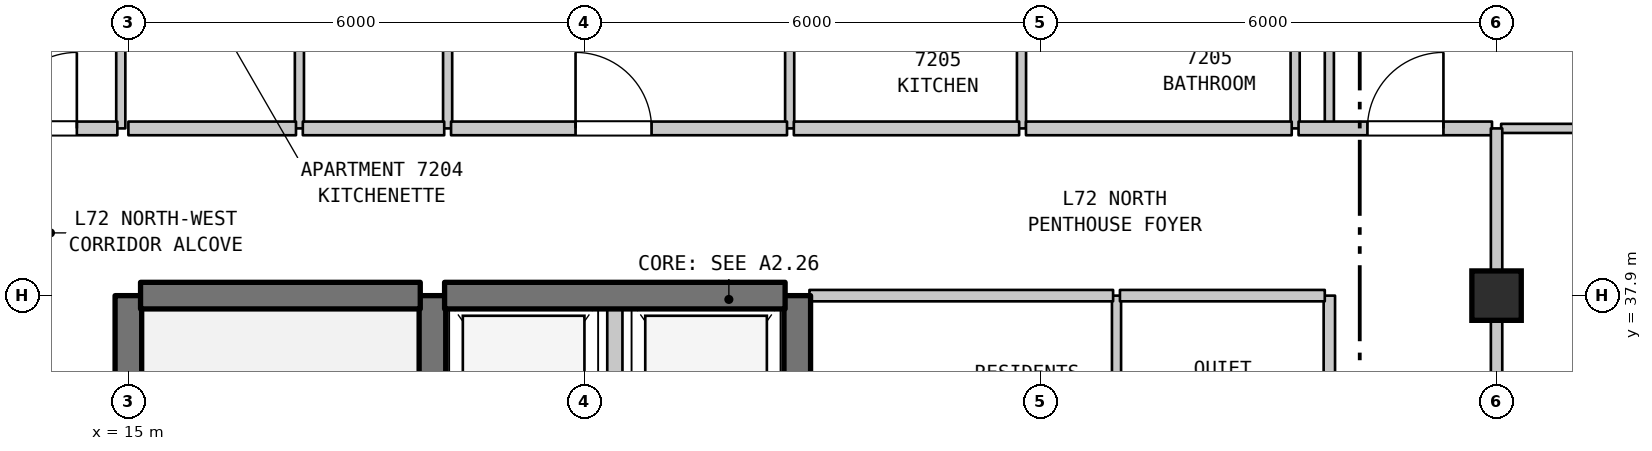
"""IFC4 building model, lengths in metres.
Left out: names, types, materials, properties, quantities, classifications, styles, units other than length and angle.
Written with IfcOpenShell. Run it as: python <this file> out.ifc"""

import sys

from ifc_helpers import new_model, si_unit, direction, frame, frame_2d, origin, origin_2d, place, context, subcontext, project, spatial, rectangle, extrude, element, fill, save


model = new_model("IFC4")
c1 = context("Model", 3, precision=1e-05, world=origin(), true_north=direction((0.0, 1.0)))
c2 = subcontext(c1, "Body", "Model", "MODEL_VIEW")
j1 = project(units=[si_unit("LENGTHUNIT", "METRE"), si_unit("PLANEANGLEUNIT", "RADIAN")], contexts=[c1])
p1 = place(None, origin())
s1 = spatial("IfcSite", under=j1, at=p1, CompositionType="ELEMENT")
p2 = place(p1, origin())
s2 = spatial("IfcBuilding", under=s1, at=p2, CompositionType="ELEMENT")
p3 = place(p2, frame((0.0, 0.0, 288.0)))
s3 = spatial("IfcBuildingStorey", under=s2, at=p3, CompositionType="ELEMENT", Elevation=288.0)
p4 = place(p3, frame((33.0, 37.9, 0.0), z_axis=(0.0, 0.0, 1.0), x_axis=(1.0, 0.0, 0.0)))
e1 = element("IfcColumn", 1, at=p4, inside=s3, PredefinedType="COLUMN", context=c2, shape_type="SweptSolid", body=[
    extrude(rectangle(XDim=0.65, YDim=0.65, at=origin_2d()), origin(), (0.0, 0.0, 1.0), 3.7),
])
p5 = place(p3, frame((14.9, 40.1, 0.0), z_axis=(0.0, 0.0, 1.0), x_axis=(0.0, 1.0, 0.0)))
e2 = element("IfcWall", 2, at=p5, inside=s3, PredefinedType="PARTITIONING", context=c2, shape_type="SweptSolid", body=[
    extrude(rectangle(XDim=3.2, YDim=0.12, at=frame_2d((1.6, 0.0))), origin(), (0.0, 0.0, 1.0), 3.39),
])
p6 = place(p5, frame((1.15, 0.0, 0.0)))
e3 = element("IfcOpeningElement", 3, at=p6, cuts=e2, PredefinedType="OPENING", context=c2, shape_type="SweptSolid", body=[
    extrude(rectangle(XDim=0.9, YDim=2.15, at=frame_2d((0.45, 1.075))), frame((0.0, 0.07, 0.0), z_axis=(0.0, -1.0, 0.0), x_axis=(1.0, 0.0, 0.0)), (0.0, 0.0, 1.0), 0.14),
])
p7 = place(p3, frame((15.0, 31.1, 0.0), z_axis=(0.0, 0.0, 1.0), x_axis=(0.0, 1.0, 0.0)))
e4 = element("IfcWall", 4, at=p7, inside=s3, PredefinedType="SHEAR", context=c2, shape_type="SweptSolid", body=[
    extrude(rectangle(XDim=6.8, YDim=0.35, at=frame_2d((3.4, 0.0))), origin(), (0.0, 0.0, 1.0), 3.39),
])
p8 = place(p3, frame((17.25, 40.1, 0.0), z_axis=(0.0, 0.0, 1.0), x_axis=(0.0, 1.0, 0.0)))
e5 = element("IfcWall", 5, at=p8, inside=s3, PredefinedType="PARTITIONING", context=c2, shape_type="SweptSolid", body=[
    extrude(rectangle(XDim=3.2, YDim=0.12, at=frame_2d((1.6, 0.0))), origin(), (0.0, 0.0, 1.0), 3.39),
])
p9 = place(p3, frame((19.0, 35.0, 0.0), z_axis=(0.0, 0.0, 1.0), x_axis=(0.0, 1.0, 0.0)))
e6 = element("IfcWall", 6, at=p9, inside=s3, PredefinedType="SHEAR", context=c2, shape_type="SweptSolid", body=[
    extrude(rectangle(XDim=2.9, YDim=0.35, at=frame_2d((1.45, 0.0))), origin(), (0.0, 0.0, 1.0), 3.39),
])
p10 = place(p3, frame((19.2, 40.1, 0.0), z_axis=(0.0, 0.0, 1.0), x_axis=(0.0, 1.0, 0.0)))
e7 = element("IfcWall", 7, at=p10, inside=s3, PredefinedType="PARTITIONING", context=c2, shape_type="SweptSolid", body=[
    extrude(rectangle(XDim=13.79, YDim=0.12, at=frame_2d((6.895, 0.0))), origin(), (0.0, 0.0, 1.0), 3.39),
])
p11 = place(p3, frame((21.4, 35.0, 0.0), z_axis=(0.0, 0.0, 1.0), x_axis=(0.0, 1.0, 0.0)))
e8 = element("IfcWall", 8, at=p11, inside=s3, PredefinedType="STANDARD", context=c2, shape_type="SweptSolid", body=[
    extrude(rectangle(XDim=2.9, YDim=0.2, at=frame_2d((1.45, 0.0))), origin(), (0.0, 0.0, 1.0), 3.39),
])
p12 = place(p3, frame((23.7, 40.1, 0.0), z_axis=(0.0, 0.0, 1.0), x_axis=(0.0, 1.0, 0.0)))
e9 = element("IfcWall", 9, at=p12, inside=s3, PredefinedType="PARTITIONING", context=c2, shape_type="SweptSolid", body=[
    extrude(rectangle(XDim=2.3, YDim=0.12, at=frame_2d((1.15, 0.0))), origin(), (0.0, 0.0, 1.0), 3.39),
])
p13 = place(p3, frame((23.8, 35.0, 0.0), z_axis=(0.0, 0.0, 1.0), x_axis=(0.0, 1.0, 0.0)))
e10 = element("IfcWall", 10, at=p13, inside=s3, PredefinedType="SHEAR", context=c2, shape_type="SweptSolid", body=[
    extrude(rectangle(XDim=2.9, YDim=0.35, at=frame_2d((1.45, 0.0))), origin(), (0.0, 0.0, 1.0), 3.39),
])
p14 = place(p3, frame((26.75, 40.1, 0.0), z_axis=(0.0, 0.0, 1.0), x_axis=(0.0, 1.0, 0.0)))
e11 = element("IfcWall", 11, at=p14, inside=s3, PredefinedType="PARTITIONING", context=c2, shape_type="SweptSolid", body=[
    extrude(rectangle(XDim=2.3, YDim=0.12, at=frame_2d((1.15, 0.0))), origin(), (0.0, 0.0, 1.0), 3.39),
])
p15 = place(p3, frame((28.0, 35.0, 0.0), z_axis=(0.0, 0.0, 1.0), x_axis=(0.0, 1.0, 0.0)))
e12 = element("IfcWall", 12, at=p15, inside=s3, PredefinedType="PARTITIONING", context=c2, shape_type="SweptSolid", body=[
    extrude(rectangle(XDim=2.9, YDim=0.12, at=frame_2d((1.45, 0.0))), origin(), (0.0, 0.0, 1.0), 3.39),
])
p16 = place(p3, frame((30.35, 40.1, 0.0), z_axis=(0.0, 0.0, 1.0), x_axis=(0.0, 1.0, 0.0)))
e13 = element("IfcWall", 13, at=p16, inside=s3, PredefinedType="PARTITIONING", context=c2, shape_type="SweptSolid", body=[
    extrude(rectangle(XDim=2.3, YDim=0.12, at=frame_2d((1.15, 0.0))), origin(), (0.0, 0.0, 1.0), 3.39),
])
p17 = place(p3, frame((30.8, 35.0, 0.0), z_axis=(0.0, 0.0, 1.0), x_axis=(0.0, 1.0, 0.0)))
e14 = element("IfcWall", 14, at=p17, inside=s3, PredefinedType="STANDARD", context=c2, shape_type="SweptSolid", body=[
    extrude(rectangle(XDim=2.9, YDim=0.15, at=frame_2d((1.45, 0.0))), origin(), (0.0, 0.0, 1.0), 3.39),
])
p18 = place(p3, frame((30.8, 40.1, 0.0), z_axis=(0.0, 0.0, 1.0), x_axis=(0.0, 1.0, 0.0)))
e15 = element("IfcWall", 15, at=p18, inside=s3, PredefinedType="PARTITIONING", context=c2, shape_type="SweptSolid", body=[
    extrude(rectangle(XDim=13.79, YDim=0.12, at=frame_2d((6.895, 0.0))), origin(), (0.0, 0.0, 1.0), 3.39),
])
p19 = place(p3, frame((15.16, 37.9, 0.0), z_axis=(0.0, 0.0, 1.0), x_axis=(1.0, 0.0, 0.0)))
e16 = element("IfcWall", 16, at=p19, inside=s3, PredefinedType="SHEAR", context=c2, shape_type="SweptSolid", body=[
    extrude(rectangle(XDim=3.68, YDim=0.35, at=frame_2d((1.84, 0.0))), origin(), (0.0, 0.0, 1.0), 3.39),
])
p20 = place(p3, frame((19.16, 37.9, 0.0), z_axis=(0.0, 0.0, 1.0), x_axis=(1.0, 0.0, 0.0)))
e17 = element("IfcWall", 17, at=p20, inside=s3, PredefinedType="SHEAR", context=c2, shape_type="SweptSolid", body=[
    extrude(rectangle(XDim=4.48, YDim=0.35, at=frame_2d((2.24, 0.0))), origin(), (0.0, 0.0, 1.0), 3.39),
])
p21 = place(p3, frame((23.96, 37.9, 0.0), z_axis=(0.0, 0.0, 1.0), x_axis=(1.0, 0.0, 0.0)))
e18 = element("IfcWall", 18, at=p21, inside=s3, PredefinedType="STANDARD", context=c2, shape_type="SweptSolid", body=[
    extrude(rectangle(XDim=3.995, YDim=0.15, at=frame_2d((1.998, 0.0))), origin(), (0.0, 0.0, 1.0), 2.89),
])
p22 = place(p3, frame((28.045, 37.9, 0.0), z_axis=(0.0, 0.0, 1.0), x_axis=(1.0, 0.0, 0.0)))
e19 = element("IfcWall", 19, at=p22, inside=s3, PredefinedType="STANDARD", context=c2, shape_type="SweptSolid", body=[
    extrude(rectangle(XDim=2.695, YDim=0.15, at=frame_2d((1.348, 0.0))), origin(), (0.0, 0.0, 1.0), 2.89),
])
p23 = place(p3, frame((12.975, 40.1, 0.0), z_axis=(0.0, 0.0, 1.0), x_axis=(1.0, 0.0, 0.0)))
e20 = element("IfcWall", 20, at=p23, inside=s3, PredefinedType="STANDARD", context=c2, shape_type="SweptSolid", body=[
    extrude(rectangle(XDim=1.88, YDim=0.18, at=frame_2d((0.94, 0.0))), origin(), (0.0, 0.0, 1.0), 3.39),
])
p24 = place(p23, frame((0.347, 0.0, 0.0)))
e21 = element("IfcOpeningElement", 21, at=p24, cuts=e20, PredefinedType="OPENING", context=c2, shape_type="SweptSolid", body=[
    extrude(rectangle(XDim=1.0, YDim=2.15, at=frame_2d((0.5, 1.075))), frame((0.0, 0.1, 0.0), z_axis=(0.0, -1.0, 0.0), x_axis=(1.0, 0.0, 0.0)), (0.0, 0.0, 1.0), 0.2),
])
p25 = place(p3, frame((15.0, 40.1, 0.0), z_axis=(0.0, 0.0, 1.0), x_axis=(1.0, 0.0, 0.0)))
e22 = element("IfcWall", 22, at=p25, inside=s3, PredefinedType="STANDARD", context=c2, shape_type="SweptSolid", body=[
    extrude(rectangle(XDim=2.205, YDim=0.18, at=frame_2d((1.103, 0.0))), origin(), (0.0, 0.0, 1.0), 3.39),
])
p26 = place(p3, frame((17.295, 40.1, 0.0), z_axis=(0.0, 0.0, 1.0), x_axis=(1.0, 0.0, 0.0)))
e23 = element("IfcWall", 23, at=p26, inside=s3, PredefinedType="STANDARD", context=c2, shape_type="SweptSolid", body=[
    extrude(rectangle(XDim=1.86, YDim=0.18, at=frame_2d((0.93, 0.0))), origin(), (0.0, 0.0, 1.0), 3.39),
])
p27 = place(p3, frame((19.245, 40.1, 0.0), z_axis=(0.0, 0.0, 1.0), x_axis=(1.0, 0.0, 0.0)))
e24 = element("IfcWall", 24, at=p27, inside=s3, PredefinedType="STANDARD", context=c2, shape_type="SweptSolid", body=[
    extrude(rectangle(XDim=4.42, YDim=0.18, at=frame_2d((2.21, 0.0))), origin(), (0.0, 0.0, 1.0), 3.39),
])
p28 = place(p27, frame((1.638, 0.0, 0.0)))
e25 = element("IfcOpeningElement", 25, at=p28, cuts=e24, PredefinedType="OPENING", context=c2, shape_type="SweptSolid", body=[
    extrude(rectangle(XDim=1.0, YDim=2.15, at=frame_2d((0.5, 1.075))), frame((0.0, 0.1, 0.0), z_axis=(0.0, -1.0, 0.0), x_axis=(1.0, 0.0, 0.0)), (0.0, 0.0, 1.0), 0.2),
])
p29 = place(p3, frame((23.755, 40.1, 0.0), z_axis=(0.0, 0.0, 1.0), x_axis=(1.0, 0.0, 0.0)))
e26 = element("IfcWall", 26, at=p29, inside=s3, PredefinedType="STANDARD", context=c2, shape_type="SweptSolid", body=[
    extrude(rectangle(XDim=2.964, YDim=0.18, at=frame_2d((1.482, 0.0))), origin(), (0.0, 0.0, 1.0), 3.39),
])
p30 = place(p3, frame((26.809, 40.1, 0.0), z_axis=(0.0, 0.0, 1.0), x_axis=(1.0, 0.0, 0.0)))
e27 = element("IfcWall", 27, at=p30, inside=s3, PredefinedType="STANDARD", context=c2, shape_type="SweptSolid", body=[
    extrude(rectangle(XDim=3.496, YDim=0.18, at=frame_2d((1.748, 0.0))), origin(), (0.0, 0.0, 1.0), 3.39),
])
p31 = place(p3, frame((30.395, 40.1, 0.0), z_axis=(0.0, 0.0, 1.0), x_axis=(1.0, 0.0, 0.0)))
e28 = element("IfcWall", 28, at=p31, inside=s3, PredefinedType="STANDARD", context=c2, shape_type="SweptSolid", body=[
    extrude(rectangle(XDim=2.545, YDim=0.18, at=frame_2d((1.272, 0.0))), origin(), (0.0, 0.0, 1.0), 3.39),
])
p32 = place(p31, frame((0.906, 0.0, 0.0)))
e29 = element("IfcOpeningElement", 29, at=p32, cuts=e28, PredefinedType="OPENING", context=c2, shape_type="SweptSolid", body=[
    extrude(rectangle(XDim=1.0, YDim=2.15, at=frame_2d((0.5, 1.075))), frame((0.0, 0.1, 0.0), z_axis=(0.0, -1.0, 0.0), x_axis=(1.0, 0.0, 0.0)), (0.0, 0.0, 1.0), 0.2),
])
p33 = place(p3, frame((33.06, 40.1, 0.0), z_axis=(0.0, 0.0, 1.0), x_axis=(1.0, 0.0, 0.0)))
e30 = element("IfcWall", 30, at=p33, inside=s3, PredefinedType="PARTITIONING", context=c2, shape_type="SweptSolid", body=[
    extrude(rectangle(XDim=2.075, YDim=0.12, at=frame_2d((1.038, 0.0))), origin(), (0.0, 0.0, 1.0), 3.39),
])
p34 = place(p3, frame((33.0, 27.9, 0.0), z_axis=(0.0, 0.0, 1.0), x_axis=(0.0, 1.0, 0.0)))
e31 = element("IfcWall", 31, at=p34, inside=s3, PredefinedType="STANDARD", context=c2, shape_type="SweptSolid", body=[
    extrude(rectangle(XDim=10.0, YDim=0.15, at=frame_2d((5.0, 0.0))), origin(), (0.0, 0.0, 1.0), 2.89),
])
p35 = place(p34, frame((1.4, 0.0, 0.0)))
e32 = element("IfcOpeningElement", 32, at=p35, cuts=e31, PredefinedType="OPENING", context=c2, shape_type="SweptSolid", body=[
    extrude(rectangle(XDim=1.0, YDim=2.15, at=frame_2d((0.5, 1.075))), frame((0.0, 0.085, 0.0), z_axis=(0.0, -1.0, 0.0), x_axis=(1.0, 0.0, 0.0)), (0.0, 0.0, 1.0), 0.17),
])
p36 = place(p3, frame((33.0, 37.9, 0.0), z_axis=(0.0, 0.0, 1.0), x_axis=(0.0, 1.0, 0.0)))
e33 = element("IfcWall", 33, at=p36, inside=s3, PredefinedType="STANDARD", context=c2, shape_type="SweptSolid", body=[
    extrude(rectangle(XDim=2.2, YDim=0.15, at=frame_2d((1.1, 0.0))), origin(), (0.0, 0.0, 1.0), 2.79),
])
p37 = place(p24, origin())
e34 = element("IfcDoor", 34, at=p37, inside=s3, OperationType="SINGLE_SWING_RIGHT", PredefinedType="DOOR", context=c2, shape_type="SweptSolid", body=[
    extrude(rectangle(XDim=1.0, YDim=2.15, at=frame_2d((0.5, 1.075))), frame((0.0, 0.025, 0.0), z_axis=(0.0, -1.0, 0.0), x_axis=(1.0, 0.0, 0.0)), (0.0, 0.0, 1.0), 0.05),
])
fill(e21, e34)
p38 = place(p28, origin())
e35 = element("IfcDoor", 35, at=p38, inside=s3, OperationType="SINGLE_SWING_LEFT", PredefinedType="DOOR", context=c2, shape_type="SweptSolid", body=[
    extrude(rectangle(XDim=1.0, YDim=2.15, at=frame_2d((0.5, 1.075))), frame((0.0, 0.025, 0.0), z_axis=(0.0, -1.0, 0.0), x_axis=(1.0, 0.0, 0.0)), (0.0, 0.0, 1.0), 0.05),
])
fill(e25, e35)
p39 = place(p32, origin())
e36 = element("IfcDoor", 36, at=p39, inside=s3, OperationType="SINGLE_SWING_RIGHT", PredefinedType="DOOR", context=c2, shape_type="SweptSolid", body=[
    extrude(rectangle(XDim=1.0, YDim=2.15, at=frame_2d((0.5, 1.075))), frame((0.0, 0.025, 0.0), z_axis=(0.0, -1.0, 0.0), x_axis=(1.0, 0.0, 0.0)), (0.0, 0.0, 1.0), 0.05),
])
fill(e29, e36)
save(model, sys.argv[1])
